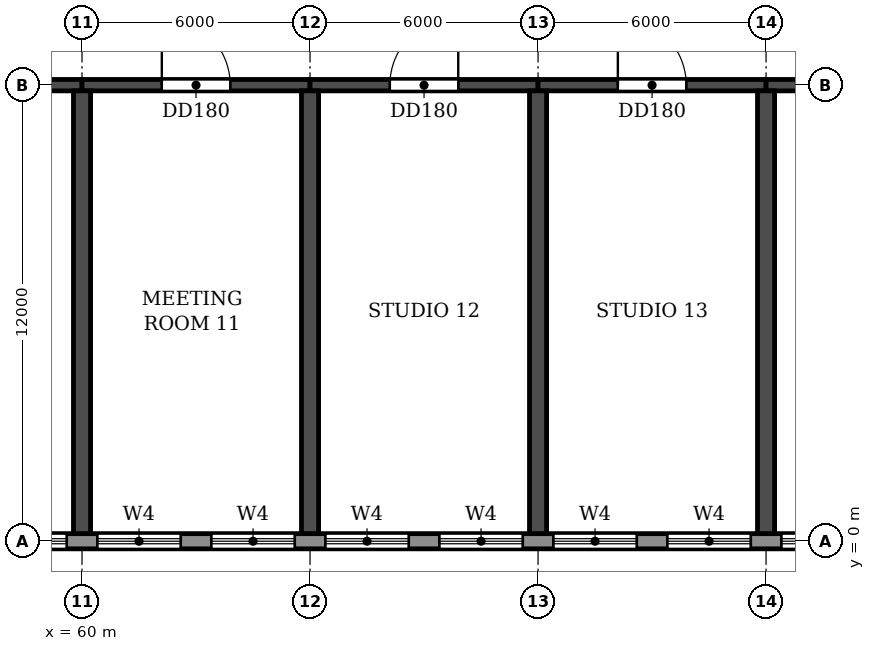
"""IFC4 building model, lengths in metres.
Left out: names, types, materials, properties, quantities, classifications, styles, units other than length and angle.
Written with IfcOpenShell. Run it as: python <this file> out.ifc"""

import sys

from ifc_helpers import new_model, si_unit, direction, frame, frame_2d, origin, place, context, subcontext, project, spatial, rectangle, extrude, element, fill, save


model = new_model("IFC4")
c1 = context("Model", 3, precision=1e-05, world=origin(), true_north=direction((0.0, 1.0)))
c2 = subcontext(c1, "Body", "Model", "MODEL_VIEW")
j1 = project(units=[si_unit("LENGTHUNIT", "METRE"), si_unit("PLANEANGLEUNIT", "RADIAN")], contexts=[c1])
p1 = place(None, origin())
s1 = spatial("IfcSite", under=j1, at=p1, CompositionType="ELEMENT")
p2 = place(p1, origin())
s2 = spatial("IfcBuilding", under=s1, at=p2, CompositionType="ELEMENT")
p3 = place(p2, frame((0.0, 0.0, 19.2)))
s3 = spatial("IfcBuildingStorey", under=s2, at=p3, CompositionType="ELEMENT", Elevation=19.2)
for number, where, z_axis, x_axis in (
    (1, (60.0, 0.2, 0.0), (0.0, 0.0, 1.0), (0.0, 1.0, 0.0)),
    (2, (66.0, 0.2, 0.0), (0.0, 0.0, 1.0), (0.0, 1.0, 0.0)),
    (3, (72.0, 0.2, 0.0), (0.0, 0.0, 1.0), (0.0, 1.0, 0.0)),
    (4, (78.0, 0.2, 0.0), (0.0, 0.0, 1.0), (0.0, 1.0, 0.0)),
):
    element("IfcWall", number, at=place(p3, frame(where, z_axis=z_axis, x_axis=x_axis)), inside=s3, PredefinedType="SHEAR", context=c2, shape_type="SweptSolid", body=[
        extrude(rectangle(XDim=11.65, YDim=0.45, at=frame_2d((5.825, 0.0))), origin(), (0.0, 0.0, 1.0), 3.95),
    ])
p4 = place(p3, frame((54.0, 12.0, 0.0), z_axis=(0.0, 0.0, 1.0), x_axis=(1.0, 0.0, 0.0)))
e5 = element("IfcWall", 5, at=p4, inside=s3, PredefinedType="SHEAR", context=c2, shape_type="SweptSolid", body=[
    extrude(rectangle(XDim=6.0, YDim=0.3, at=frame_2d((3.0, 0.0))), origin(), (0.0, 0.0, 1.0), 3.35),
])
p5 = place(p4, frame((2.1, 0.0, 0.0)))
e6 = element("IfcOpeningElement", 6, at=p5, cuts=e5, PredefinedType="OPENING", context=c2, shape_type="SweptSolid", body=[
    extrude(rectangle(XDim=1.8, YDim=2.1, at=frame_2d((0.9, 1.05))), frame((0.0, 0.16, 0.0), z_axis=(0.0, -1.0, 0.0), x_axis=(1.0, 0.0, 0.0)), (0.0, 0.0, 1.0), 0.32),
])
p6 = place(p3, frame((60.0, 12.0, 0.0), z_axis=(0.0, 0.0, 1.0), x_axis=(1.0, 0.0, 0.0)))
e7 = element("IfcWall", 7, at=p6, inside=s3, PredefinedType="SHEAR", context=c2, shape_type="SweptSolid", body=[
    extrude(rectangle(XDim=6.0, YDim=0.3, at=frame_2d((3.0, 0.0))), origin(), (0.0, 0.0, 1.0), 3.35),
])
p7 = place(p6, frame((2.1, 0.0, 0.0)))
e8 = element("IfcOpeningElement", 8, at=p7, cuts=e7, PredefinedType="OPENING", context=c2, shape_type="SweptSolid", body=[
    extrude(rectangle(XDim=1.8, YDim=2.1, at=frame_2d((0.9, 1.05))), frame((0.0, 0.16, 0.0), z_axis=(0.0, -1.0, 0.0), x_axis=(1.0, 0.0, 0.0)), (0.0, 0.0, 1.0), 0.32),
])
p8 = place(p3, frame((66.0, 12.0, 0.0), z_axis=(0.0, 0.0, 1.0), x_axis=(1.0, 0.0, 0.0)))
e9 = element("IfcWall", 9, at=p8, inside=s3, PredefinedType="SHEAR", context=c2, shape_type="SweptSolid", body=[
    extrude(rectangle(XDim=6.0, YDim=0.3, at=frame_2d((3.0, 0.0))), origin(), (0.0, 0.0, 1.0), 3.35),
])
p9 = place(p8, frame((2.1, 0.0, 0.0)))
e10 = element("IfcOpeningElement", 10, at=p9, cuts=e9, PredefinedType="OPENING", context=c2, shape_type="SweptSolid", body=[
    extrude(rectangle(XDim=1.8, YDim=2.1, at=frame_2d((0.9, 1.05))), frame((0.0, 0.16, 0.0), z_axis=(0.0, -1.0, 0.0), x_axis=(1.0, 0.0, 0.0)), (0.0, 0.0, 1.0), 0.32),
])
p10 = place(p3, frame((72.0, 12.0, 0.0), z_axis=(0.0, 0.0, 1.0), x_axis=(1.0, 0.0, 0.0)))
e11 = element("IfcWall", 11, at=p10, inside=s3, PredefinedType="SHEAR", context=c2, shape_type="SweptSolid", body=[
    extrude(rectangle(XDim=6.0, YDim=0.3, at=frame_2d((3.0, 0.0))), origin(), (0.0, 0.0, 1.0), 3.35),
])
p11 = place(p10, frame((2.1, 0.0, 0.0)))
e12 = element("IfcOpeningElement", 12, at=p11, cuts=e11, PredefinedType="OPENING", context=c2, shape_type="SweptSolid", body=[
    extrude(rectangle(XDim=1.8, YDim=2.1, at=frame_2d((0.9, 1.05))), frame((0.0, 0.16, 0.0), z_axis=(0.0, -1.0, 0.0), x_axis=(1.0, 0.0, 0.0)), (0.0, 0.0, 1.0), 0.32),
])
p12 = place(p3, frame((78.0, 12.0, 0.0), z_axis=(0.0, 0.0, 1.0), x_axis=(1.0, 0.0, 0.0)))
e13 = element("IfcWall", 13, at=p12, inside=s3, PredefinedType="SHEAR", context=c2, shape_type="SweptSolid", body=[
    extrude(rectangle(XDim=6.0, YDim=0.3, at=frame_2d((3.0, 0.0))), origin(), (0.0, 0.0, 1.0), 3.35),
])
p13 = place(p12, frame((2.1, 0.0, 0.0)))
e14 = element("IfcOpeningElement", 14, at=p13, cuts=e13, PredefinedType="OPENING", context=c2, shape_type="SweptSolid", body=[
    extrude(rectangle(XDim=1.8, YDim=2.1, at=frame_2d((0.9, 1.05))), frame((0.0, 0.16, 0.0), z_axis=(0.0, -1.0, 0.0), x_axis=(1.0, 0.0, 0.0)), (0.0, 0.0, 1.0), 0.32),
])
p14 = place(p3, frame((-3.0, 0.0, 0.0), z_axis=(0.0, 0.0, 1.0), x_axis=(1.0, 0.0, 0.0)))
e15 = element("IfcWall", 15, at=p14, inside=s3, PredefinedType="STANDARD", context=c2, shape_type="SweptSolid", body=[
    extrude(rectangle(XDim=108.0, YDim=0.4, at=frame_2d((54.0, 0.0))), origin(), (0.0, 0.0, 1.0), 3.95),
])
p15 = place(p14, frame((3.4, 0.0, 0.9)))
e16 = element("IfcOpeningElement", 16, at=p15, cuts=e15, PredefinedType="OPENING", context=c2, shape_type="SweptSolid", body=[
    extrude(rectangle(XDim=2.2, YDim=2.7, at=frame_2d((1.1, 1.35))), frame((0.0, 0.21, 0.0), z_axis=(0.0, -1.0, 0.0), x_axis=(1.0, 0.0, 0.0)), (0.0, 0.0, 1.0), 0.42),
])
p16 = place(p14, frame((6.4, 0.0, 0.9)))
e17 = element("IfcOpeningElement", 17, at=p16, cuts=e15, PredefinedType="OPENING", context=c2, shape_type="SweptSolid", body=[
    extrude(rectangle(XDim=2.2, YDim=2.7, at=frame_2d((1.1, 1.35))), frame((0.0, 0.21, 0.0), z_axis=(0.0, -1.0, 0.0), x_axis=(1.0, 0.0, 0.0)), (0.0, 0.0, 1.0), 0.42),
])
p17 = place(p14, frame((9.4, 0.0, 0.9)))
e18 = element("IfcOpeningElement", 18, at=p17, cuts=e15, PredefinedType="OPENING", context=c2, shape_type="SweptSolid", body=[
    extrude(rectangle(XDim=2.2, YDim=2.7, at=frame_2d((1.1, 1.35))), frame((0.0, 0.21, 0.0), z_axis=(0.0, -1.0, 0.0), x_axis=(1.0, 0.0, 0.0)), (0.0, 0.0, 1.0), 0.42),
])
p18 = place(p14, frame((12.4, 0.0, 0.9)))
e19 = element("IfcOpeningElement", 19, at=p18, cuts=e15, PredefinedType="OPENING", context=c2, shape_type="SweptSolid", body=[
    extrude(rectangle(XDim=2.2, YDim=2.7, at=frame_2d((1.1, 1.35))), frame((0.0, 0.21, 0.0), z_axis=(0.0, -1.0, 0.0), x_axis=(1.0, 0.0, 0.0)), (0.0, 0.0, 1.0), 0.42),
])
p19 = place(p14, frame((15.4, 0.0, 0.9)))
e20 = element("IfcOpeningElement", 20, at=p19, cuts=e15, PredefinedType="OPENING", context=c2, shape_type="SweptSolid", body=[
    extrude(rectangle(XDim=2.2, YDim=2.7, at=frame_2d((1.1, 1.35))), frame((0.0, 0.21, 0.0), z_axis=(0.0, -1.0, 0.0), x_axis=(1.0, 0.0, 0.0)), (0.0, 0.0, 1.0), 0.42),
])
p20 = place(p14, frame((18.4, 0.0, 0.9)))
e21 = element("IfcOpeningElement", 21, at=p20, cuts=e15, PredefinedType="OPENING", context=c2, shape_type="SweptSolid", body=[
    extrude(rectangle(XDim=2.2, YDim=2.7, at=frame_2d((1.1, 1.35))), frame((0.0, 0.21, 0.0), z_axis=(0.0, -1.0, 0.0), x_axis=(1.0, 0.0, 0.0)), (0.0, 0.0, 1.0), 0.42),
])
p21 = place(p14, frame((21.4, 0.0, 0.9)))
e22 = element("IfcOpeningElement", 22, at=p21, cuts=e15, PredefinedType="OPENING", context=c2, shape_type="SweptSolid", body=[
    extrude(rectangle(XDim=2.2, YDim=2.7, at=frame_2d((1.1, 1.35))), frame((0.0, 0.21, 0.0), z_axis=(0.0, -1.0, 0.0), x_axis=(1.0, 0.0, 0.0)), (0.0, 0.0, 1.0), 0.42),
])
p22 = place(p14, frame((24.4, 0.0, 0.9)))
e23 = element("IfcOpeningElement", 23, at=p22, cuts=e15, PredefinedType="OPENING", context=c2, shape_type="SweptSolid", body=[
    extrude(rectangle(XDim=2.2, YDim=2.7, at=frame_2d((1.1, 1.35))), frame((0.0, 0.21, 0.0), z_axis=(0.0, -1.0, 0.0), x_axis=(1.0, 0.0, 0.0)), (0.0, 0.0, 1.0), 0.42),
])
p23 = place(p14, frame((27.4, 0.0, 0.9)))
e24 = element("IfcOpeningElement", 24, at=p23, cuts=e15, PredefinedType="OPENING", context=c2, shape_type="SweptSolid", body=[
    extrude(rectangle(XDim=2.2, YDim=2.7, at=frame_2d((1.1, 1.35))), frame((0.0, 0.21, 0.0), z_axis=(0.0, -1.0, 0.0), x_axis=(1.0, 0.0, 0.0)), (0.0, 0.0, 1.0), 0.42),
])
p24 = place(p14, frame((30.4, 0.0, 0.9)))
e25 = element("IfcOpeningElement", 25, at=p24, cuts=e15, PredefinedType="OPENING", context=c2, shape_type="SweptSolid", body=[
    extrude(rectangle(XDim=2.2, YDim=2.7, at=frame_2d((1.1, 1.35))), frame((0.0, 0.21, 0.0), z_axis=(0.0, -1.0, 0.0), x_axis=(1.0, 0.0, 0.0)), (0.0, 0.0, 1.0), 0.42),
])
p25 = place(p14, frame((33.4, 0.0, 0.9)))
e26 = element("IfcOpeningElement", 26, at=p25, cuts=e15, PredefinedType="OPENING", context=c2, shape_type="SweptSolid", body=[
    extrude(rectangle(XDim=2.2, YDim=2.7, at=frame_2d((1.1, 1.35))), frame((0.0, 0.21, 0.0), z_axis=(0.0, -1.0, 0.0), x_axis=(1.0, 0.0, 0.0)), (0.0, 0.0, 1.0), 0.42),
])
p26 = place(p14, frame((36.4, 0.0, 0.9)))
e27 = element("IfcOpeningElement", 27, at=p26, cuts=e15, PredefinedType="OPENING", context=c2, shape_type="SweptSolid", body=[
    extrude(rectangle(XDim=2.2, YDim=2.7, at=frame_2d((1.1, 1.35))), frame((0.0, 0.21, 0.0), z_axis=(0.0, -1.0, 0.0), x_axis=(1.0, 0.0, 0.0)), (0.0, 0.0, 1.0), 0.42),
])
p27 = place(p14, frame((39.4, 0.0, 0.9)))
e28 = element("IfcOpeningElement", 28, at=p27, cuts=e15, PredefinedType="OPENING", context=c2, shape_type="SweptSolid", body=[
    extrude(rectangle(XDim=2.2, YDim=2.7, at=frame_2d((1.1, 1.35))), frame((0.0, 0.21, 0.0), z_axis=(0.0, -1.0, 0.0), x_axis=(1.0, 0.0, 0.0)), (0.0, 0.0, 1.0), 0.42),
])
p28 = place(p14, frame((42.4, 0.0, 0.9)))
e29 = element("IfcOpeningElement", 29, at=p28, cuts=e15, PredefinedType="OPENING", context=c2, shape_type="SweptSolid", body=[
    extrude(rectangle(XDim=2.2, YDim=2.7, at=frame_2d((1.1, 1.35))), frame((0.0, 0.21, 0.0), z_axis=(0.0, -1.0, 0.0), x_axis=(1.0, 0.0, 0.0)), (0.0, 0.0, 1.0), 0.42),
])
p29 = place(p14, frame((45.4, 0.0, 0.9)))
e30 = element("IfcOpeningElement", 30, at=p29, cuts=e15, PredefinedType="OPENING", context=c2, shape_type="SweptSolid", body=[
    extrude(rectangle(XDim=2.2, YDim=2.7, at=frame_2d((1.1, 1.35))), frame((0.0, 0.21, 0.0), z_axis=(0.0, -1.0, 0.0), x_axis=(1.0, 0.0, 0.0)), (0.0, 0.0, 1.0), 0.42),
])
p30 = place(p14, frame((48.4, 0.0, 0.9)))
e31 = element("IfcOpeningElement", 31, at=p30, cuts=e15, PredefinedType="OPENING", context=c2, shape_type="SweptSolid", body=[
    extrude(rectangle(XDim=2.2, YDim=2.7, at=frame_2d((1.1, 1.35))), frame((0.0, 0.21, 0.0), z_axis=(0.0, -1.0, 0.0), x_axis=(1.0, 0.0, 0.0)), (0.0, 0.0, 1.0), 0.42),
])
p31 = place(p14, frame((51.4, 0.0, 0.9)))
e32 = element("IfcOpeningElement", 32, at=p31, cuts=e15, PredefinedType="OPENING", context=c2, shape_type="SweptSolid", body=[
    extrude(rectangle(XDim=2.2, YDim=2.7, at=frame_2d((1.1, 1.35))), frame((0.0, 0.21, 0.0), z_axis=(0.0, -1.0, 0.0), x_axis=(1.0, 0.0, 0.0)), (0.0, 0.0, 1.0), 0.42),
])
p32 = place(p14, frame((54.4, 0.0, 0.9)))
e33 = element("IfcOpeningElement", 33, at=p32, cuts=e15, PredefinedType="OPENING", context=c2, shape_type="SweptSolid", body=[
    extrude(rectangle(XDim=2.2, YDim=2.7, at=frame_2d((1.1, 1.35))), frame((0.0, 0.21, 0.0), z_axis=(0.0, -1.0, 0.0), x_axis=(1.0, 0.0, 0.0)), (0.0, 0.0, 1.0), 0.42),
])
p33 = place(p14, frame((57.4, 0.0, 0.9)))
e34 = element("IfcOpeningElement", 34, at=p33, cuts=e15, PredefinedType="OPENING", context=c2, shape_type="SweptSolid", body=[
    extrude(rectangle(XDim=2.2, YDim=2.7, at=frame_2d((1.1, 1.35))), frame((0.0, 0.21, 0.0), z_axis=(0.0, -1.0, 0.0), x_axis=(1.0, 0.0, 0.0)), (0.0, 0.0, 1.0), 0.42),
])
p34 = place(p14, frame((60.4, 0.0, 0.9)))
e35 = element("IfcOpeningElement", 35, at=p34, cuts=e15, PredefinedType="OPENING", context=c2, shape_type="SweptSolid", body=[
    extrude(rectangle(XDim=2.2, YDim=2.7, at=frame_2d((1.1, 1.35))), frame((0.0, 0.21, 0.0), z_axis=(0.0, -1.0, 0.0), x_axis=(1.0, 0.0, 0.0)), (0.0, 0.0, 1.0), 0.42),
])
p35 = place(p14, frame((63.4, 0.0, 0.9)))
e36 = element("IfcOpeningElement", 36, at=p35, cuts=e15, PredefinedType="OPENING", context=c2, shape_type="SweptSolid", body=[
    extrude(rectangle(XDim=2.2, YDim=2.7, at=frame_2d((1.1, 1.35))), frame((0.0, 0.21, 0.0), z_axis=(0.0, -1.0, 0.0), x_axis=(1.0, 0.0, 0.0)), (0.0, 0.0, 1.0), 0.42),
])
p36 = place(p14, frame((66.4, 0.0, 0.9)))
e37 = element("IfcOpeningElement", 37, at=p36, cuts=e15, PredefinedType="OPENING", context=c2, shape_type="SweptSolid", body=[
    extrude(rectangle(XDim=2.2, YDim=2.7, at=frame_2d((1.1, 1.35))), frame((0.0, 0.21, 0.0), z_axis=(0.0, -1.0, 0.0), x_axis=(1.0, 0.0, 0.0)), (0.0, 0.0, 1.0), 0.42),
])
p37 = place(p14, frame((69.4, 0.0, 0.9)))
e38 = element("IfcOpeningElement", 38, at=p37, cuts=e15, PredefinedType="OPENING", context=c2, shape_type="SweptSolid", body=[
    extrude(rectangle(XDim=2.2, YDim=2.7, at=frame_2d((1.1, 1.35))), frame((0.0, 0.21, 0.0), z_axis=(0.0, -1.0, 0.0), x_axis=(1.0, 0.0, 0.0)), (0.0, 0.0, 1.0), 0.42),
])
p38 = place(p14, frame((72.4, 0.0, 0.9)))
e39 = element("IfcOpeningElement", 39, at=p38, cuts=e15, PredefinedType="OPENING", context=c2, shape_type="SweptSolid", body=[
    extrude(rectangle(XDim=2.2, YDim=2.7, at=frame_2d((1.1, 1.35))), frame((0.0, 0.21, 0.0), z_axis=(0.0, -1.0, 0.0), x_axis=(1.0, 0.0, 0.0)), (0.0, 0.0, 1.0), 0.42),
])
p39 = place(p14, frame((75.4, 0.0, 0.9)))
e40 = element("IfcOpeningElement", 40, at=p39, cuts=e15, PredefinedType="OPENING", context=c2, shape_type="SweptSolid", body=[
    extrude(rectangle(XDim=2.2, YDim=2.7, at=frame_2d((1.1, 1.35))), frame((0.0, 0.21, 0.0), z_axis=(0.0, -1.0, 0.0), x_axis=(1.0, 0.0, 0.0)), (0.0, 0.0, 1.0), 0.42),
])
p40 = place(p14, frame((78.4, 0.0, 0.9)))
e41 = element("IfcOpeningElement", 41, at=p40, cuts=e15, PredefinedType="OPENING", context=c2, shape_type="SweptSolid", body=[
    extrude(rectangle(XDim=2.2, YDim=2.7, at=frame_2d((1.1, 1.35))), frame((0.0, 0.21, 0.0), z_axis=(0.0, -1.0, 0.0), x_axis=(1.0, 0.0, 0.0)), (0.0, 0.0, 1.0), 0.42),
])
p41 = place(p14, frame((81.4, 0.0, 0.9)))
e42 = element("IfcOpeningElement", 42, at=p41, cuts=e15, PredefinedType="OPENING", context=c2, shape_type="SweptSolid", body=[
    extrude(rectangle(XDim=2.2, YDim=2.7, at=frame_2d((1.1, 1.35))), frame((0.0, 0.21, 0.0), z_axis=(0.0, -1.0, 0.0), x_axis=(1.0, 0.0, 0.0)), (0.0, 0.0, 1.0), 0.42),
])
p42 = place(p14, frame((84.4, 0.0, 0.9)))
e43 = element("IfcOpeningElement", 43, at=p42, cuts=e15, PredefinedType="OPENING", context=c2, shape_type="SweptSolid", body=[
    extrude(rectangle(XDim=2.2, YDim=2.7, at=frame_2d((1.1, 1.35))), frame((0.0, 0.21, 0.0), z_axis=(0.0, -1.0, 0.0), x_axis=(1.0, 0.0, 0.0)), (0.0, 0.0, 1.0), 0.42),
])
p43 = place(p14, frame((87.4, 0.0, 0.9)))
e44 = element("IfcOpeningElement", 44, at=p43, cuts=e15, PredefinedType="OPENING", context=c2, shape_type="SweptSolid", body=[
    extrude(rectangle(XDim=2.2, YDim=2.7, at=frame_2d((1.1, 1.35))), frame((0.0, 0.21, 0.0), z_axis=(0.0, -1.0, 0.0), x_axis=(1.0, 0.0, 0.0)), (0.0, 0.0, 1.0), 0.42),
])
p44 = place(p14, frame((90.4, 0.0, 0.9)))
e45 = element("IfcOpeningElement", 45, at=p44, cuts=e15, PredefinedType="OPENING", context=c2, shape_type="SweptSolid", body=[
    extrude(rectangle(XDim=2.2, YDim=2.7, at=frame_2d((1.1, 1.35))), frame((0.0, 0.21, 0.0), z_axis=(0.0, -1.0, 0.0), x_axis=(1.0, 0.0, 0.0)), (0.0, 0.0, 1.0), 0.42),
])
p45 = place(p14, frame((93.4, 0.0, 0.9)))
e46 = element("IfcOpeningElement", 46, at=p45, cuts=e15, PredefinedType="OPENING", context=c2, shape_type="SweptSolid", body=[
    extrude(rectangle(XDim=2.2, YDim=2.7, at=frame_2d((1.1, 1.35))), frame((0.0, 0.21, 0.0), z_axis=(0.0, -1.0, 0.0), x_axis=(1.0, 0.0, 0.0)), (0.0, 0.0, 1.0), 0.42),
])
p46 = place(p14, frame((96.4, 0.0, 0.9)))
e47 = element("IfcOpeningElement", 47, at=p46, cuts=e15, PredefinedType="OPENING", context=c2, shape_type="SweptSolid", body=[
    extrude(rectangle(XDim=2.2, YDim=2.7, at=frame_2d((1.1, 1.35))), frame((0.0, 0.21, 0.0), z_axis=(0.0, -1.0, 0.0), x_axis=(1.0, 0.0, 0.0)), (0.0, 0.0, 1.0), 0.42),
])
p47 = place(p14, frame((99.4, 0.0, 0.9)))
e48 = element("IfcOpeningElement", 48, at=p47, cuts=e15, PredefinedType="OPENING", context=c2, shape_type="SweptSolid", body=[
    extrude(rectangle(XDim=2.2, YDim=2.7, at=frame_2d((1.1, 1.35))), frame((0.0, 0.21, 0.0), z_axis=(0.0, -1.0, 0.0), x_axis=(1.0, 0.0, 0.0)), (0.0, 0.0, 1.0), 0.42),
])
p48 = place(p14, frame((102.4, 0.0, 0.9)))
e49 = element("IfcOpeningElement", 49, at=p48, cuts=e15, PredefinedType="OPENING", context=c2, shape_type="SweptSolid", body=[
    extrude(rectangle(XDim=2.2, YDim=2.7, at=frame_2d((1.1, 1.35))), frame((0.0, 0.21, 0.0), z_axis=(0.0, -1.0, 0.0), x_axis=(1.0, 0.0, 0.0)), (0.0, 0.0, 1.0), 0.42),
])
p49 = place(p34, origin())
e50 = element("IfcWindow", 50, at=p49, inside=s3, PartitioningType="DOUBLE_PANEL_HORIZONTAL", PredefinedType="WINDOW", context=c2, shape_type="SweptSolid", body=[
    extrude(rectangle(XDim=2.2, YDim=2.7, at=frame_2d((1.1, 1.35))), frame((0.0, 0.03, 0.0), z_axis=(0.0, -1.0, 0.0), x_axis=(1.0, 0.0, 0.0)), (0.0, 0.0, 1.0), 0.06),
])
fill(e35, e50)
p50 = place(p35, origin())
e51 = element("IfcWindow", 51, at=p50, inside=s3, PartitioningType="DOUBLE_PANEL_HORIZONTAL", PredefinedType="WINDOW", context=c2, shape_type="SweptSolid", body=[
    extrude(rectangle(XDim=2.2, YDim=2.7, at=frame_2d((1.1, 1.35))), frame((0.0, 0.03, 0.0), z_axis=(0.0, -1.0, 0.0), x_axis=(1.0, 0.0, 0.0)), (0.0, 0.0, 1.0), 0.06),
])
fill(e36, e51)
p51 = place(p36, origin())
e52 = element("IfcWindow", 52, at=p51, inside=s3, PartitioningType="DOUBLE_PANEL_HORIZONTAL", PredefinedType="WINDOW", context=c2, shape_type="SweptSolid", body=[
    extrude(rectangle(XDim=2.2, YDim=2.7, at=frame_2d((1.1, 1.35))), frame((0.0, 0.03, 0.0), z_axis=(0.0, -1.0, 0.0), x_axis=(1.0, 0.0, 0.0)), (0.0, 0.0, 1.0), 0.06),
])
fill(e37, e52)
p52 = place(p37, origin())
e53 = element("IfcWindow", 53, at=p52, inside=s3, PartitioningType="DOUBLE_PANEL_HORIZONTAL", PredefinedType="WINDOW", context=c2, shape_type="SweptSolid", body=[
    extrude(rectangle(XDim=2.2, YDim=2.7, at=frame_2d((1.1, 1.35))), frame((0.0, 0.03, 0.0), z_axis=(0.0, -1.0, 0.0), x_axis=(1.0, 0.0, 0.0)), (0.0, 0.0, 1.0), 0.06),
])
fill(e38, e53)
p53 = place(p38, origin())
e54 = element("IfcWindow", 54, at=p53, inside=s3, PartitioningType="DOUBLE_PANEL_HORIZONTAL", PredefinedType="WINDOW", context=c2, shape_type="SweptSolid", body=[
    extrude(rectangle(XDim=2.2, YDim=2.7, at=frame_2d((1.1, 1.35))), frame((0.0, 0.03, 0.0), z_axis=(0.0, -1.0, 0.0), x_axis=(1.0, 0.0, 0.0)), (0.0, 0.0, 1.0), 0.06),
])
fill(e39, e54)
p54 = place(p39, origin())
e55 = element("IfcWindow", 55, at=p54, inside=s3, PartitioningType="DOUBLE_PANEL_HORIZONTAL", PredefinedType="WINDOW", context=c2, shape_type="SweptSolid", body=[
    extrude(rectangle(XDim=2.2, YDim=2.7, at=frame_2d((1.1, 1.35))), frame((0.0, 0.03, 0.0), z_axis=(0.0, -1.0, 0.0), x_axis=(1.0, 0.0, 0.0)), (0.0, 0.0, 1.0), 0.06),
])
fill(e40, e55)
p55 = place(p40, origin())
e56 = element("IfcWindow", 56, at=p55, inside=s3, PartitioningType="DOUBLE_PANEL_HORIZONTAL", PredefinedType="WINDOW", context=c2, shape_type="SweptSolid", body=[
    extrude(rectangle(XDim=2.2, YDim=2.7, at=frame_2d((1.1, 1.35))), frame((0.0, 0.03, 0.0), z_axis=(0.0, -1.0, 0.0), x_axis=(1.0, 0.0, 0.0)), (0.0, 0.0, 1.0), 0.06),
])
fill(e41, e56)
p56 = place(p41, origin())
e57 = element("IfcWindow", 57, at=p56, inside=s3, PartitioningType="DOUBLE_PANEL_HORIZONTAL", PredefinedType="WINDOW", context=c2, shape_type="SweptSolid", body=[
    extrude(rectangle(XDim=2.2, YDim=2.7, at=frame_2d((1.1, 1.35))), frame((0.0, 0.03, 0.0), z_axis=(0.0, -1.0, 0.0), x_axis=(1.0, 0.0, 0.0)), (0.0, 0.0, 1.0), 0.06),
])
fill(e42, e57)
p57 = place(p7, origin())
e58 = element("IfcDoor", 58, at=p57, inside=s3, OperationType="DOUBLE_DOOR_SINGLE_SWING", PredefinedType="DOOR", context=c2, shape_type="SweptSolid", body=[
    extrude(rectangle(XDim=1.8, YDim=2.1, at=frame_2d((0.9, 1.05))), frame((0.0, 0.025, 0.0), z_axis=(0.0, -1.0, 0.0), x_axis=(1.0, 0.0, 0.0)), (0.0, 0.0, 1.0), 0.05),
])
fill(e8, e58)
p58 = place(p9, origin())
e59 = element("IfcDoor", 59, at=p58, inside=s3, OperationType="DOUBLE_DOOR_SINGLE_SWING", PredefinedType="DOOR", context=c2, shape_type="SweptSolid", body=[
    extrude(rectangle(XDim=1.8, YDim=2.1, at=frame_2d((0.9, 1.05))), frame((0.0, 0.025, 0.0), z_axis=(0.0, -1.0, 0.0), x_axis=(1.0, 0.0, 0.0)), (0.0, 0.0, 1.0), 0.05),
])
fill(e10, e59)
p59 = place(p11, origin())
e60 = element("IfcDoor", 60, at=p59, inside=s3, OperationType="DOUBLE_DOOR_SINGLE_SWING", PredefinedType="DOOR", context=c2, shape_type="SweptSolid", body=[
    extrude(rectangle(XDim=1.8, YDim=2.1, at=frame_2d((0.9, 1.05))), frame((0.0, 0.025, 0.0), z_axis=(0.0, -1.0, 0.0), x_axis=(1.0, 0.0, 0.0)), (0.0, 0.0, 1.0), 0.05),
])
fill(e12, e60)
save(model, sys.argv[1])
